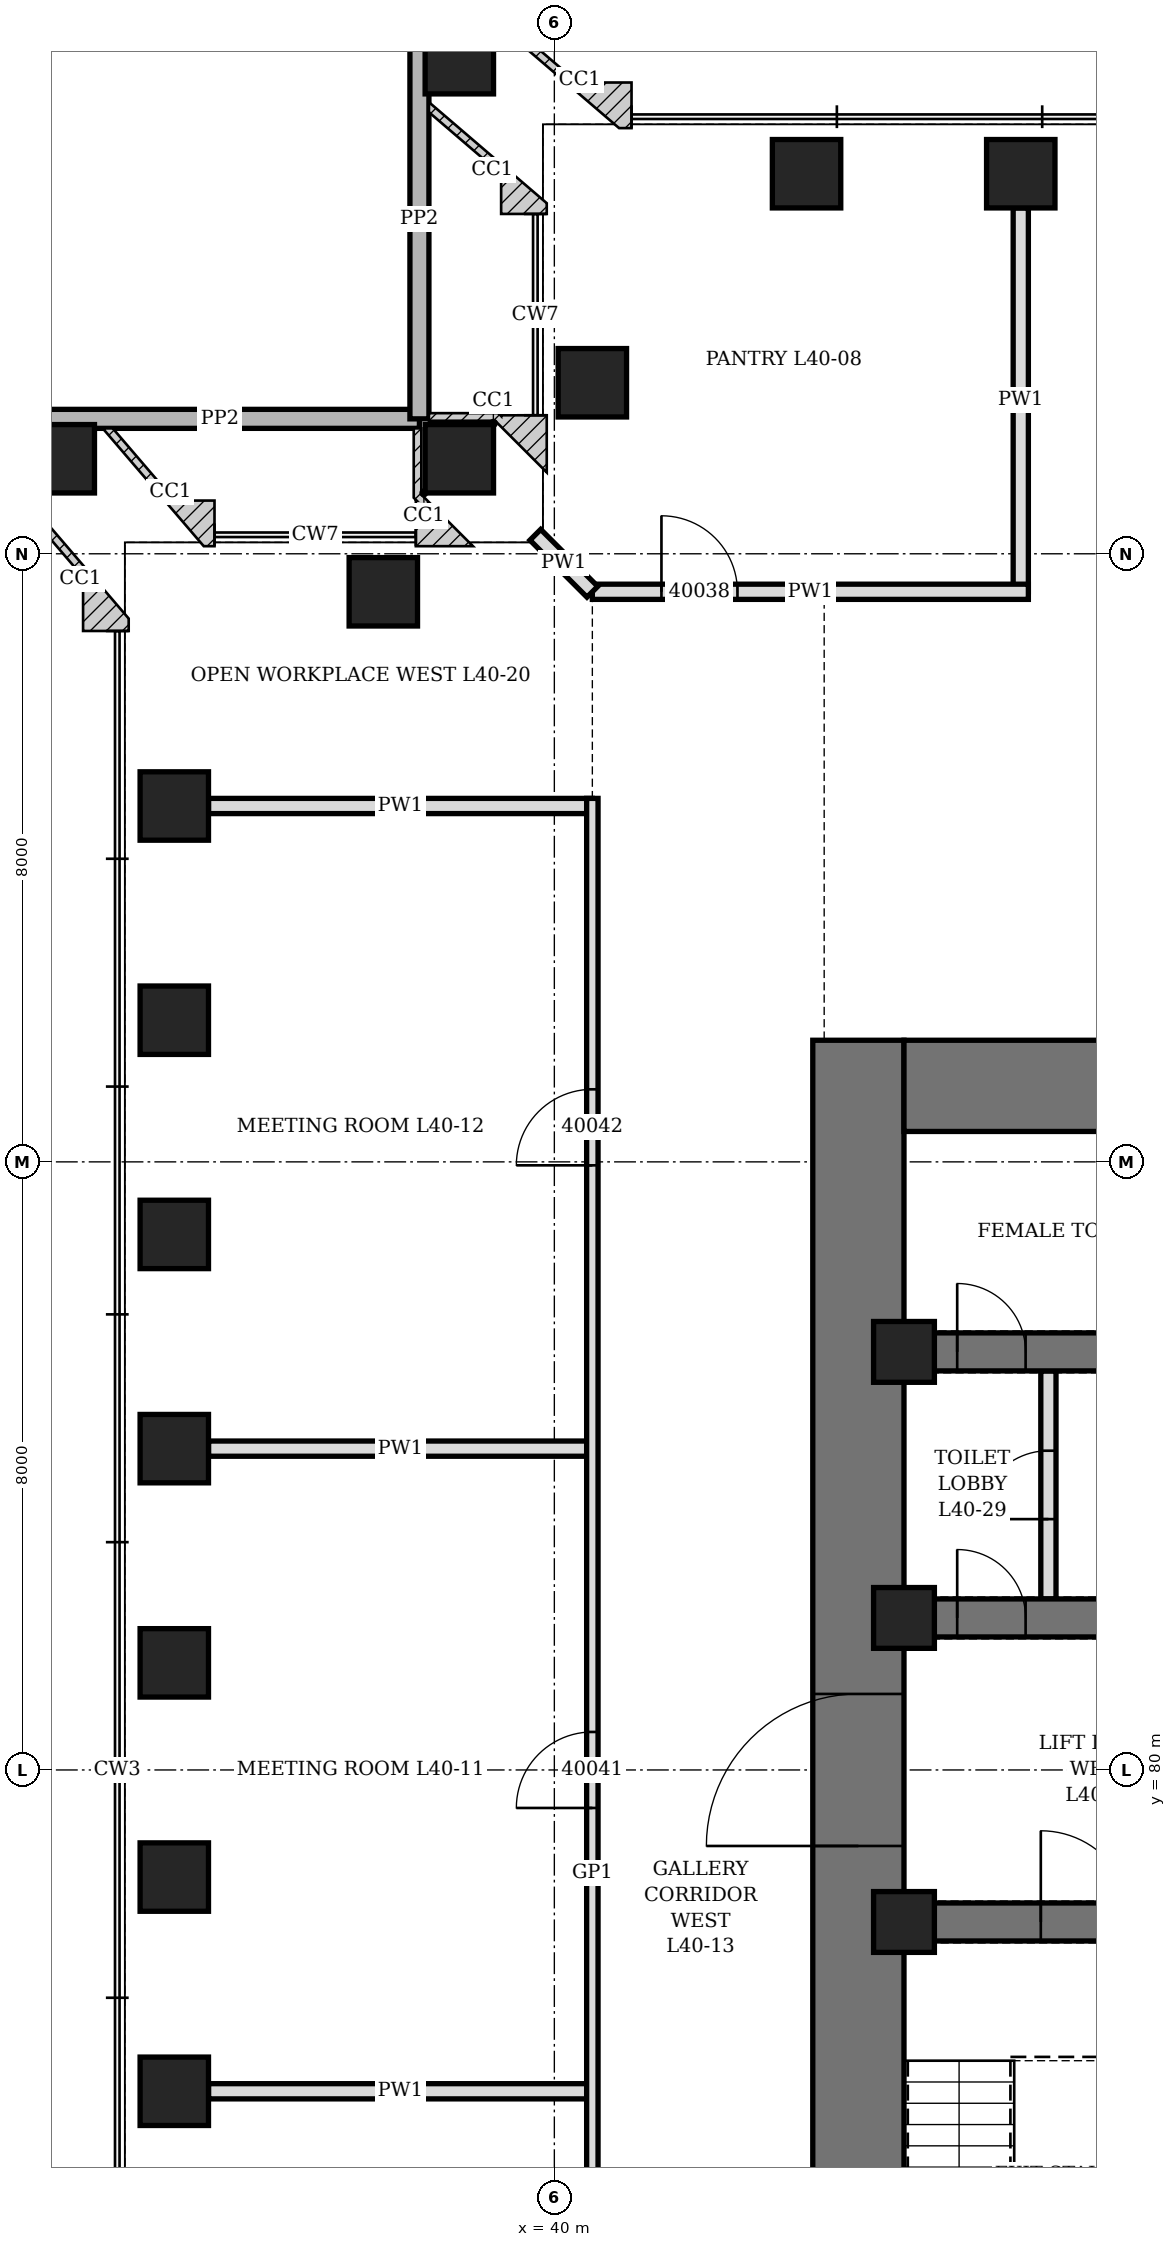
"""IFC4 building model, lengths in metres.
Left out: names, types, materials, properties, quantities, classifications, styles, units other than length and angle.
Written with IfcOpenShell. Run it as: python <this file> out.ifc"""

import sys

from ifc_helpers import new_model, si_unit, direction, frame, frame_2d, origin, origin_2d, place, context, subcontext, project, spatial, rectangle, hollow_rectangle, extrude, clip, halfspace, element, fill, save


model = new_model("IFC4")
c1 = context("Model", 3, precision=1e-05, world=origin(), true_north=direction((0.0, 1.0)))
c2 = subcontext(c1, "Body", "Model", "MODEL_VIEW")
j1 = project(units=[si_unit("LENGTHUNIT", "METRE"), si_unit("PLANEANGLEUNIT", "RADIAN")], contexts=[c1])
p1 = place(None, origin())
s1 = spatial("IfcSite", under=j1, at=p1, CompositionType="ELEMENT")
p2 = place(p1, origin())
s2 = spatial("IfcBuilding", under=s1, at=p2, CompositionType="ELEMENT")
p3 = place(p2, frame((0.0, 0.0, 181.3)))
s3 = spatial("IfcBuildingStorey", under=s2, at=p3, CompositionType="ELEMENT", Elevation=181.3)
for number, where, z_axis, x_axis in (
    (1, (46.136, 101.0, -0.25), (0.0, 0.0, 1.0), (1.0, 0.0, 0.0)),
    (2, (43.318, 101.0, -0.25), (0.0, 0.0, 1.0), (1.0, 0.0, 0.0)),
):
    element("IfcColumn", number, at=place(p3, frame(where, z_axis=z_axis, x_axis=x_axis)), inside=s3, PredefinedType="COLUMN", context=c2, shape_type="SweptSolid", body=[
        extrude(hollow_rectangle(XDim=0.9, YDim=0.9, WallThickness=0.15, at=origin_2d()), origin(), (0.0, 0.0, 1.0), 4.45),
    ])
p4 = place(p3, frame((38.75, 102.5, -0.25), z_axis=(0.349200787792, -0.299314960964, 0.887957974202), x_axis=(0.650791373456, 0.759256602365, 0.0)))
e3 = element("IfcColumn", 3, at=p4, inside=s3, PredefinedType="COLUMN", context=c2, shape_type="Clipping", body=[
    clip(clip(extrude(hollow_rectangle(XDim=0.9, YDim=0.9, WallThickness=0.15, at=origin_2d()), origin(), (0.0, 0.0, 1.0), 5.011), halfspace(frame((0.0, 0.0, 0.235), z_axis=(0.0, 0.0, 1.0), x_axis=(1.0, 0.0, 0.0)), True)), halfspace(frame((0.0, 0.0, 4.776), z_axis=(0.0, 0.0, -1.0), x_axis=(1.0, 0.0, 0.0)), True)),
])
p5 = place(p3, frame((40.5, 98.25, -0.25), z_axis=(0.0, 0.0, 1.0), x_axis=(0.0, 1.0, 0.0)))
e4 = element("IfcColumn", 4, at=p5, inside=s3, PredefinedType="COLUMN", context=c2, shape_type="SweptSolid", body=[
    extrude(hollow_rectangle(XDim=0.9, YDim=0.9, WallThickness=0.15, at=origin_2d()), origin(), (0.0, 0.0, 1.0), 4.45),
])
p6 = place(p3, frame((38.75, 97.25, -0.25), z_axis=(0.343685624304, -0.343685624304, 0.873933855216), x_axis=(0.707106781187, 0.707106781187, 0.0)))
e5 = element("IfcColumn", 5, at=p6, inside=s3, PredefinedType="COLUMN", context=c2, shape_type="Clipping", body=[
    clip(clip(extrude(hollow_rectangle(XDim=0.9, YDim=0.9, WallThickness=0.15, at=origin_2d()), origin(), (0.0, 0.0, 1.0), 5.092), halfspace(frame((0.0, 0.0, 0.253), z_axis=(0.0, 0.0, 1.0), x_axis=(1.0, 0.0, 0.0)), True)), halfspace(frame((0.0, 0.0, 4.839), z_axis=(0.0, 0.0, -1.0), x_axis=(1.0, 0.0, 0.0)), True)),
])
p7 = place(p3, frame((37.75, 95.5, -0.25), z_axis=(0.0, 0.0, 1.0), x_axis=(1.0, 0.0, 0.0)))
e6 = element("IfcColumn", 6, at=p7, inside=s3, PredefinedType="COLUMN", context=c2, shape_type="SweptSolid", body=[
    extrude(hollow_rectangle(XDim=0.9, YDim=0.9, WallThickness=0.15, at=origin_2d()), origin(), (0.0, 0.0, 1.0), 4.45),
])
p8 = place(p3, frame((33.5, 97.25, -0.25), z_axis=(0.299314960964, -0.349200787792, 0.887957974202), x_axis=(0.759256602365, 0.650791373456, 0.0)))
e7 = element("IfcColumn", 7, at=p8, inside=s3, PredefinedType="COLUMN", context=c2, shape_type="Clipping", body=[
    clip(clip(extrude(hollow_rectangle(XDim=0.9, YDim=0.9, WallThickness=0.15, at=origin_2d()), origin(), (0.0, 0.0, 1.0), 5.011), halfspace(frame((0.0, 0.0, 0.235), z_axis=(0.0, 0.0, 1.0), x_axis=(1.0, 0.0, 0.0)), True)), halfspace(frame((0.0, 0.0, 4.776), z_axis=(0.0, 0.0, -1.0), x_axis=(1.0, 0.0, 0.0)), True)),
])
for number, where, z_axis, x_axis in (
    (8, (35.0, 92.682, -0.25), (0.0, 0.0, 1.0), (0.0, 1.0, 0.0)),
    (9, (35.0, 89.864, -0.25), (0.0, 0.0, 1.0), (0.0, 1.0, 0.0)),
    (10, (35.0, 87.045, -0.25), (0.0, 0.0, 1.0), (0.0, 1.0, 0.0)),
    (11, (35.0, 84.227, -0.25), (0.0, 0.0, 1.0), (0.0, 1.0, 0.0)),
    (12, (35.0, 81.409, -0.25), (0.0, 0.0, 1.0), (0.0, 1.0, 0.0)),
    (13, (35.0, 78.591, -0.25), (0.0, 0.0, 1.0), (0.0, 1.0, 0.0)),
    (14, (35.0, 75.773, -0.25), (0.0, 0.0, 1.0), (0.0, 1.0, 0.0)),
):
    element("IfcColumn", number, at=place(p3, frame(where, z_axis=z_axis, x_axis=x_axis)), inside=s3, PredefinedType="COLUMN", context=c2, shape_type="SweptSolid", body=[
        extrude(hollow_rectangle(XDim=0.9, YDim=0.9, WallThickness=0.15, at=origin_2d()), origin(), (0.0, 0.0, 1.0), 4.45),
    ])
p9 = place(p3, frame((44.0, 70.4, 0.0), z_axis=(0.0, 0.0, 1.0), x_axis=(0.0, 1.0, 0.0)))
e15 = element("IfcWall", 15, at=p9, inside=s3, PredefinedType="SHEAR", context=c2, shape_type="SweptSolid", body=[
    extrude(rectangle(XDim=19.2, YDim=1.2, at=frame_2d((9.6, 0.0))), origin(), (0.0, 0.0, 1.0), 4.2),
])
p10 = place(p9, frame((8.6, 0.0, 0.0)))
e16 = element("IfcOpeningElement", 16, at=p10, cuts=e15, PredefinedType="OPENING", context=c2, shape_type="SweptSolid", body=[
    extrude(rectangle(XDim=2.0, YDim=2.4, at=frame_2d((1.0, 1.2))), frame((0.0, 0.61, 0.0), z_axis=(0.0, -1.0, 0.0), x_axis=(1.0, 0.0, 0.0)), (0.0, 0.0, 1.0), 1.22),
])
p11 = place(p3, frame((44.6, 89.0, 0.0), z_axis=(0.0, 0.0, 1.0), x_axis=(1.0, 0.0, 0.0)))
e17 = element("IfcWall", 17, at=p11, inside=s3, PredefinedType="SHEAR", context=c2, shape_type="SweptSolid", body=[
    extrude(rectangle(XDim=22.8, YDim=1.2, at=frame_2d((11.4, 0.0))), origin(), (0.0, 0.0, 1.0), 4.2),
])
p12 = place(p11, frame((6.35, 0.0, 0.0)))
e18 = element("IfcOpeningElement", 18, at=p12, cuts=e17, PredefinedType="OPENING", context=c2, shape_type="SweptSolid", body=[
    extrude(rectangle(XDim=1.0, YDim=2.1, at=frame_2d((0.5, 1.05))), frame((0.0, 0.61, 0.0), z_axis=(0.0, -1.0, 0.0), x_axis=(1.0, 0.0, 0.0)), (0.0, 0.0, 1.0), 1.22),
])
p13 = place(p11, frame((9.25, 0.0, 0.0)))
e19 = element("IfcOpeningElement", 19, at=p13, cuts=e17, PredefinedType="OPENING", context=c2, shape_type="SweptSolid", body=[
    extrude(rectangle(XDim=0.9, YDim=2.1, at=frame_2d((0.45, 1.05))), frame((0.0, 0.61, 0.0), z_axis=(0.0, -1.0, 0.0), x_axis=(1.0, 0.0, 0.0)), (0.0, 0.0, 1.0), 1.22),
])
p14 = place(p11, frame((12.05, 0.0, 0.0)))
e20 = element("IfcOpeningElement", 20, at=p14, cuts=e17, PredefinedType="OPENING", context=c2, shape_type="SweptSolid", body=[
    extrude(rectangle(XDim=0.9, YDim=2.1, at=frame_2d((0.45, 1.05))), frame((0.0, 0.61, 0.0), z_axis=(0.0, -1.0, 0.0), x_axis=(1.0, 0.0, 0.0)), (0.0, 0.0, 1.0), 1.22),
])
p15 = place(p11, frame((13.975, 0.0, 0.0)))
e21 = element("IfcOpeningElement", 21, at=p15, cuts=e17, PredefinedType="OPENING", context=c2, shape_type="SweptSolid", body=[
    extrude(rectangle(XDim=0.9, YDim=2.1, at=frame_2d((0.45, 1.05))), frame((0.0, 0.61, 0.0), z_axis=(0.0, -1.0, 0.0), x_axis=(1.0, 0.0, 0.0)), (0.0, 0.0, 1.0), 1.22),
])
p16 = place(p3, frame((44.6, 78.0, 0.0), z_axis=(0.0, 0.0, 1.0), x_axis=(1.0, 0.0, 0.0)))
e22 = element("IfcWall", 22, at=p16, inside=s3, PredefinedType="SHEAR", context=c2, shape_type="SweptSolid", body=[
    extrude(rectangle(XDim=5.15, YDim=0.5, at=frame_2d((2.575, 0.0))), origin(), (0.0, 0.0, 1.0), 4.2),
])
p17 = place(p16, frame((1.8, 0.0, 0.0)))
e23 = element("IfcOpeningElement", 23, at=p17, cuts=e22, PredefinedType="OPENING", context=c2, shape_type="SweptSolid", body=[
    extrude(rectangle(XDim=1.2, YDim=2.1, at=frame_2d((0.6, 1.05))), frame((0.0, 0.26, 0.0), z_axis=(0.0, -1.0, 0.0), x_axis=(1.0, 0.0, 0.0)), (0.0, 0.0, 1.0), 0.52),
])
p18 = place(p3, frame((44.6, 82.0, 0.0), z_axis=(0.0, 0.0, 1.0), x_axis=(1.0, 0.0, 0.0)))
e24 = element("IfcWall", 24, at=p18, inside=s3, PredefinedType="SHEAR", context=c2, shape_type="SweptSolid", body=[
    extrude(rectangle(XDim=5.15, YDim=0.5, at=frame_2d((2.575, 0.0))), origin(), (0.0, 0.0, 1.0), 4.2),
])
p19 = place(p18, frame((0.7, 0.0, 0.0)))
e25 = element("IfcOpeningElement", 25, at=p19, cuts=e24, PredefinedType="OPENING", context=c2, shape_type="SweptSolid", body=[
    extrude(rectangle(XDim=0.9, YDim=2.1, at=frame_2d((0.45, 1.05))), frame((0.0, 0.26, 0.0), z_axis=(0.0, -1.0, 0.0), x_axis=(1.0, 0.0, 0.0)), (0.0, 0.0, 1.0), 0.52),
])
p20 = place(p3, frame((44.6, 85.5, 0.0), z_axis=(0.0, 0.0, 1.0), x_axis=(1.0, 0.0, 0.0)))
e26 = element("IfcWall", 26, at=p20, inside=s3, PredefinedType="SHEAR", context=c2, shape_type="SweptSolid", body=[
    extrude(rectangle(XDim=5.15, YDim=0.5, at=frame_2d((2.575, 0.0))), origin(), (0.0, 0.0, 1.0), 4.2),
])
p21 = place(p20, frame((0.7, 0.0, 0.0)))
e27 = element("IfcOpeningElement", 27, at=p21, cuts=e26, PredefinedType="OPENING", context=c2, shape_type="SweptSolid", body=[
    extrude(rectangle(XDim=0.9, YDim=2.1, at=frame_2d((0.45, 1.05))), frame((0.0, 0.26, 0.0), z_axis=(0.0, -1.0, 0.0), x_axis=(1.0, 0.0, 0.0)), (0.0, 0.0, 1.0), 0.52),
])
for number, where, z_axis, x_axis in (
    (28, (44.6, 78.0, 0.0), (0.0, 0.0, 1.0), (1.0, 0.0, 0.0)),
    (29, (44.6, 82.0, 0.0), (0.0, 0.0, 1.0), (1.0, 0.0, 0.0)),
    (30, (44.6, 85.5, 0.0), (0.0, 0.0, 1.0), (1.0, 0.0, 0.0)),
):
    element("IfcColumn", number, at=place(p3, frame(where, z_axis=z_axis, x_axis=x_axis)), inside=s3, PredefinedType="COLUMN", context=c2, shape_type="SweptSolid", body=[
        extrude(hollow_rectangle(XDim=0.8, YDim=0.8, WallThickness=0.1, at=origin_2d()), origin(), (0.0, 0.0, 1.0), 4.2),
    ])
for number, where, z_axis, x_axis in (
    (31, (32.975, 97.775, 0.0), (0.0, 0.0, 1.0), (1.0, 0.0, 0.0)),
    (32, (38.225, 97.775, 0.0), (0.0, 0.0, 1.0), (0.0, 1.0, 0.0)),
):
    element("IfcWall", number, at=place(p3, frame(where, z_axis=z_axis, x_axis=x_axis)), inside=s3, PredefinedType="PARAPET", context=c2, shape_type="SweptSolid", body=[
        extrude(rectangle(XDim=5.25, YDim=0.25, at=frame_2d((2.625, 0.0))), origin(), (0.0, 0.0, 1.0), 1.1),
    ])
p22 = place(p3, frame((46.5, 82.25, 0.0), z_axis=(0.0, 0.0, 1.0), x_axis=(0.0, 1.0, 0.0)))
e33 = element("IfcWall", 33, at=p22, inside=s3, PredefinedType="PARTITIONING", context=c2, shape_type="SweptSolid", body=[
    extrude(rectangle(XDim=3.0, YDim=0.2, at=frame_2d((1.5, 0.0))), origin(), (0.0, 0.0, 1.0), 4.04),
])
p23 = place(p22, frame((1.05, 0.0, 0.0)))
e34 = element("IfcOpeningElement", 34, at=p23, cuts=e33, PredefinedType="OPENING", context=c2, shape_type="SweptSolid", body=[
    extrude(rectangle(XDim=0.9, YDim=2.1, at=frame_2d((0.45, 1.05))), frame((0.0, 0.11, 0.0), z_axis=(0.0, -1.0, 0.0), x_axis=(1.0, 0.0, 0.0)), (0.0, 0.0, 1.0), 0.22),
])
for number, where, z_axis, x_axis in (
    (35, (46.136, 95.5, 0.0), (0.0, 0.0, 1.0), (0.0, 1.0, 0.0)),
    (36, (35.45, 75.773, 0.0), (0.0, 0.0, 1.0), (1.0, 0.0, 0.0)),
    (37, (35.45, 84.227, 0.0), (0.0, 0.0, 1.0), (1.0, 0.0, 0.0)),
    (38, (35.45, 92.682, 0.0), (0.0, 0.0, 1.0), (1.0, 0.0, 0.0)),
):
    element("IfcWall", number, at=place(p3, frame(where, z_axis=z_axis, x_axis=x_axis)), inside=s3, PredefinedType="PARTITIONING", context=c2, shape_type="SweptSolid", body=[
        extrude(rectangle(XDim=5.05, YDim=0.2, at=frame_2d((2.525, 0.0))), origin(), (0.0, 0.0, 1.0), 3.428),
    ])
p24 = place(p3, frame((40.5, 95.5, 0.0), z_axis=(0.0, 0.0, 1.0), x_axis=(1.0, 0.0, 0.0)))
e39 = element("IfcWall", 39, at=p24, inside=s3, PredefinedType="PARTITIONING", context=c2, shape_type="SweptSolid", body=[
    extrude(rectangle(XDim=5.736, YDim=0.2, at=frame_2d((2.868, 0.0))), origin(), (0.0, 0.0, 1.0), 4.04),
])
p25 = place(p24, frame((0.909, 0.0, 0.0)))
e40 = element("IfcOpeningElement", 40, at=p25, cuts=e39, PredefinedType="OPENING", context=c2, shape_type="SweptSolid", body=[
    extrude(rectangle(XDim=1.0, YDim=2.1, at=frame_2d((0.5, 1.05))), frame((0.0, 0.11, 0.0), z_axis=(0.0, -1.0, 0.0), x_axis=(1.0, 0.0, 0.0)), (0.0, 0.0, 1.0), 0.22),
])
p26 = place(p3, frame((40.5, 64.5, 0.0), z_axis=(0.0, 0.0, 1.0), x_axis=(0.0, 1.0, 0.0)))
e41 = element("IfcWall", 41, at=p26, inside=s3, PredefinedType="PARTITIONING", context=c2, shape_type="SweptSolid", body=[
    extrude(rectangle(XDim=28.282, YDim=0.15, at=frame_2d((14.141, 0.0))), origin(), (0.0, 0.0, 1.0), 4.04),
])
p27 = place(p26, frame((3.727, 0.0, 0.0)))
e42 = element("IfcOpeningElement", 42, at=p27, cuts=e41, PredefinedType="OPENING", context=c2, shape_type="SweptSolid", body=[
    extrude(rectangle(XDim=1.0, YDim=2.4, at=frame_2d((0.5, 1.2))), frame((0.0, 0.085, 0.0), z_axis=(0.0, -1.0, 0.0), x_axis=(1.0, 0.0, 0.0)), (0.0, 0.0, 1.0), 0.17),
])
p28 = place(p26, frame((15.0, 0.0, 0.0)))
e43 = element("IfcOpeningElement", 43, at=p28, cuts=e41, PredefinedType="OPENING", context=c2, shape_type="SweptSolid", body=[
    extrude(rectangle(XDim=1.0, YDim=2.4, at=frame_2d((0.5, 1.2))), frame((0.0, 0.085, 0.0), z_axis=(0.0, -1.0, 0.0), x_axis=(1.0, 0.0, 0.0)), (0.0, 0.0, 1.0), 0.17),
])
p29 = place(p26, frame((23.455, 0.0, 0.0)))
e44 = element("IfcOpeningElement", 44, at=p29, cuts=e41, PredefinedType="OPENING", context=c2, shape_type="SweptSolid", body=[
    extrude(rectangle(XDim=1.0, YDim=2.4, at=frame_2d((0.5, 1.2))), frame((0.0, 0.085, 0.0), z_axis=(0.0, -1.0, 0.0), x_axis=(1.0, 0.0, 0.0)), (0.0, 0.0, 1.0), 0.17),
])
p30 = place(p3, frame((40.5, 95.5, 0.0), z_axis=(0.0, 0.0, 1.0), x_axis=(-0.707106781187, 0.707106781187, 0.0)))
e45 = element("IfcWall", 45, at=p30, inside=s3, PredefinedType="PARTITIONING", context=c2, shape_type="SweptSolid", body=[
    extrude(rectangle(XDim=1.061, YDim=0.2, at=frame_2d((0.53, 0.0))), origin(), (0.0, 0.0, 1.0), 4.04),
])
p31 = place(p19, origin())
e46 = element("IfcDoor", 46, at=p31, inside=s3, OperationType="SINGLE_SWING_LEFT", PredefinedType="DOOR", context=c2, shape_type="SweptSolid", body=[
    extrude(rectangle(XDim=0.9, YDim=2.1, at=frame_2d((0.45, 1.05))), frame((0.0, 0.25, 0.0), z_axis=(0.0, -1.0, 0.0), x_axis=(1.0, 0.0, 0.0)), (0.0, 0.0, 1.0), 0.5),
])
fill(e25, e46)
p32 = place(p23, origin())
e47 = element("IfcDoor", 47, at=p32, inside=s3, OperationType="SINGLE_SWING_RIGHT", PredefinedType="DOOR", context=c2, shape_type="SweptSolid", body=[
    extrude(rectangle(XDim=0.9, YDim=2.1, at=frame_2d((0.45, 1.05))), frame((0.0, 0.1, 0.0), z_axis=(0.0, -1.0, 0.0), x_axis=(1.0, 0.0, 0.0)), (0.0, 0.0, 1.0), 0.199),
])
fill(e34, e47)
p33 = place(p21, origin())
e48 = element("IfcDoor", 48, at=p33, inside=s3, OperationType="SINGLE_SWING_RIGHT", PredefinedType="DOOR", context=c2, shape_type="SweptSolid", body=[
    extrude(rectangle(XDim=0.9, YDim=2.1, at=frame_2d((0.45, 1.05))), frame((0.0, 0.25, 0.0), z_axis=(0.0, -1.0, 0.0), x_axis=(1.0, 0.0, 0.0)), (0.0, 0.0, 1.0), 0.5),
])
fill(e27, e48)
p34 = place(p17, origin())
e49 = element("IfcDoor", 49, at=p34, inside=s3, OperationType="SINGLE_SWING_LEFT", PredefinedType="DOOR", context=c2, shape_type="SweptSolid", body=[
    extrude(rectangle(XDim=1.2, YDim=2.1, at=frame_2d((0.6, 1.05))), frame((0.0, 0.25, 0.0), z_axis=(0.0, -1.0, 0.0), x_axis=(1.0, 0.0, 0.0)), (0.0, 0.0, 1.0), 0.5),
])
fill(e23, e49)
p35 = place(p10, origin())
e50 = element("IfcDoor", 50, at=p35, inside=s3, OperationType="DOUBLE_DOOR_SINGLE_SWING", PredefinedType="DOOR", context=c2, shape_type="SweptSolid", body=[
    extrude(rectangle(XDim=2.0, YDim=2.4, at=frame_2d((1.0, 1.2))), frame((0.0, 0.35, 0.0), z_axis=(0.0, -1.0, 0.0), x_axis=(1.0, 0.0, 0.0)), (0.0, 0.0, 1.0), 0.7),
])
fill(e16, e50)
p36 = place(p25, origin())
e51 = element("IfcDoor", 51, at=p36, inside=s3, OperationType="SINGLE_SWING_LEFT", PredefinedType="DOOR", context=c2, shape_type="SweptSolid", body=[
    extrude(rectangle(XDim=1.0, YDim=2.1, at=frame_2d((0.5, 1.05))), frame((0.0, 0.1, 0.0), z_axis=(0.0, -1.0, 0.0), x_axis=(1.0, 0.0, 0.0)), (0.0, 0.0, 1.0), 0.199),
])
fill(e40, e51)
p37 = place(p28, origin())
e52 = element("IfcDoor", 52, at=p37, inside=s3, OperationType="SINGLE_SWING_RIGHT", PredefinedType="DOOR", context=c2, shape_type="SweptSolid", body=[
    extrude(rectangle(XDim=1.0, YDim=2.4, at=frame_2d((0.5, 1.2))), frame((0.0, 0.075, 0.0), z_axis=(0.0, -1.0, 0.0), x_axis=(1.0, 0.0, 0.0)), (0.0, 0.0, 1.0), 0.149),
])
fill(e43, e52)
p38 = place(p29, origin())
e53 = element("IfcDoor", 53, at=p38, inside=s3, OperationType="SINGLE_SWING_RIGHT", PredefinedType="DOOR", context=c2, shape_type="SweptSolid", body=[
    extrude(rectangle(XDim=1.0, YDim=2.4, at=frame_2d((0.5, 1.2))), frame((0.0, 0.075, 0.0), z_axis=(0.0, -1.0, 0.0), x_axis=(1.0, 0.0, 0.0)), (0.0, 0.0, 1.0), 0.149),
])
fill(e44, e53)
save(model, sys.argv[1])
